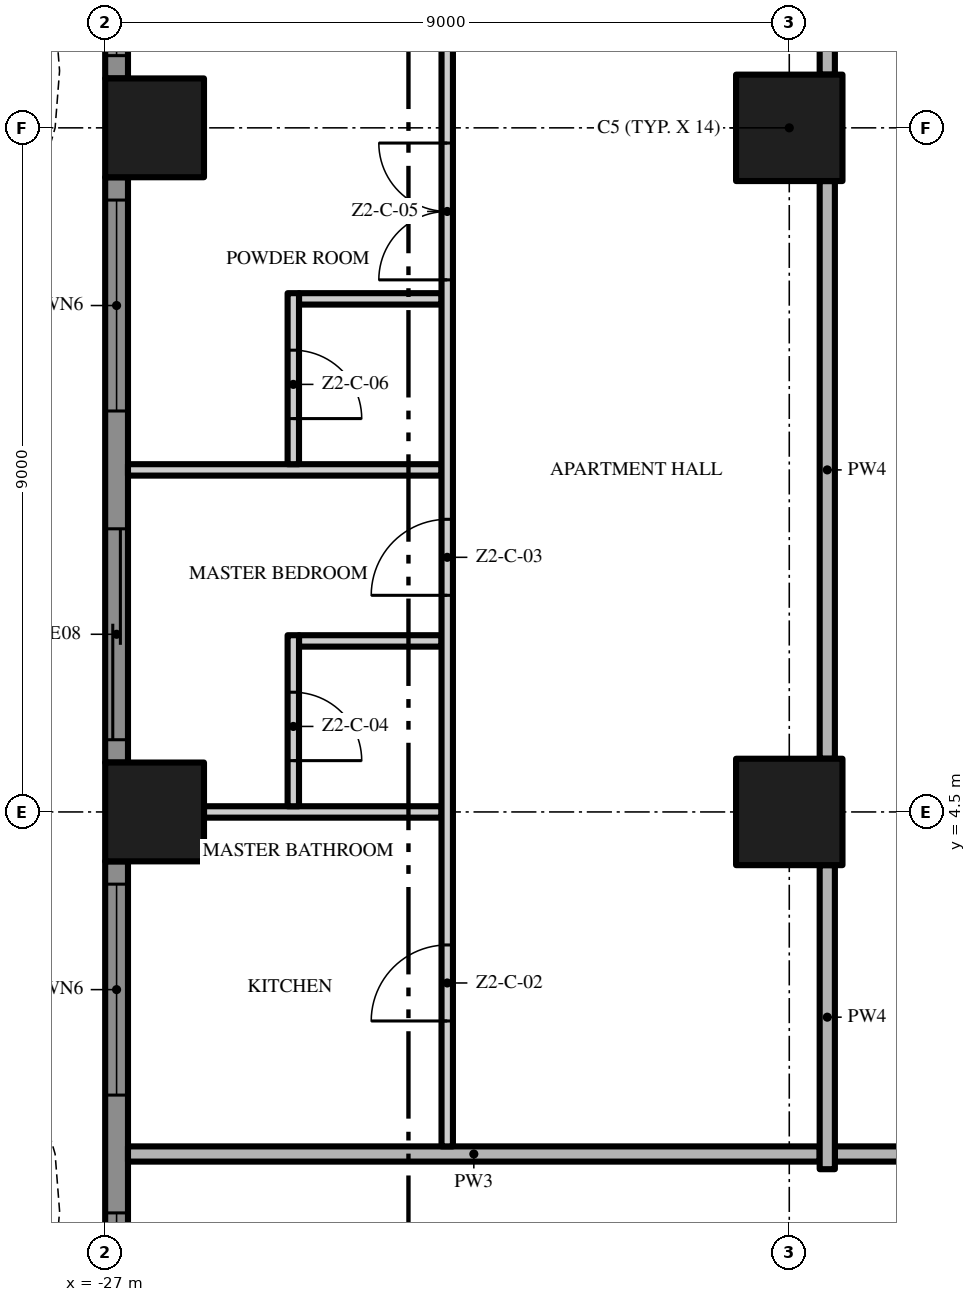
"""IFC4 building model, lengths in metres.
Left out: names, types, materials, properties, quantities, classifications, styles, units other than length and angle.
Written with IfcOpenShell. Run it as: python <this file> out.ifc"""

import sys

from ifc_helpers import new_model, si_unit, direction, frame, frame_2d, origin, origin_2d, place, context, subcontext, project, spatial, polyline, rectangle, outline, extrude, element, fill, save


model = new_model("IFC4")
c1 = context("Model", 3, precision=1e-05, world=origin(), true_north=direction((0.0, 1.0)))
c2 = subcontext(c1, "Body", "Model", "MODEL_VIEW")
j1 = project(units=[si_unit("LENGTHUNIT", "METRE"), si_unit("PLANEANGLEUNIT", "RADIAN")], contexts=[c1])
p1 = place(None, origin())
s1 = spatial("IfcSite", under=j1, at=p1, CompositionType="ELEMENT")
p2 = place(p1, origin())
s2 = spatial("IfcBuilding", under=s1, at=p2, CompositionType="ELEMENT")
p3 = place(p2, frame((0.0, 0.0, 92.2)))
s3 = spatial("IfcBuildingStorey", under=s2, at=p3, CompositionType="ELEMENT", Elevation=92.2)
for number, where, z_axis, x_axis in (
    (1, (-18.0, 13.5, 0.0), (0.0, 0.0, 1.0), (1.0, 0.0, 0.0)),
    (2, (-18.0, 4.5, 0.0), (0.0, 0.0, 1.0), (1.0, 0.0, 0.0)),
):
    element("IfcColumn", number, at=place(p3, frame(where, z_axis=z_axis, x_axis=x_axis)), inside=s3, PredefinedType="COLUMN", context=c2, shape_type="SweptSolid", body=[
        extrude(rectangle(XDim=1.4, YDim=1.4, at=origin_2d()), origin(), (0.0, 0.0, 1.0), 3.5),
    ])
for number, where, z_axis, x_axis in (
    (3, (-26.35, 13.5, 0.0), (0.0, 0.0, 1.0), (1.0, 0.0, 0.0)),
    (4, (-26.35, 4.5, 0.0), (0.0, 0.0, 1.0), (1.0, 0.0, 0.0)),
):
    element("IfcColumn", number, at=place(p3, frame(where, z_axis=z_axis, x_axis=x_axis)), inside=s3, PredefinedType="COLUMN", context=c2, shape_type="SweptSolid", body=[
        extrude(rectangle(XDim=1.3, YDim=1.3, at=origin_2d()), origin(), (0.0, 0.0, 1.0), 3.5),
    ])
p4 = place(p3, frame((-26.85, 14.15, 0.0), z_axis=(0.0, 0.0, 1.0), x_axis=(0.0, 1.0, 0.0)))
e5 = element("IfcWall", 5, at=p4, inside=s3, PredefinedType="SOLIDWALL", context=c2, shape_type="SweptSolid", body=[
    extrude(rectangle(XDim=3.55, YDim=0.3, at=frame_2d((1.775, 0.0))), origin(), (0.0, 0.0, 1.0), 3.5),
])
p5 = place(p4, frame((0.3, 0.0, 0.45)))
e6 = element("IfcOpeningElement", 6, at=p5, cuts=e5, PredefinedType="OPENING", context=c2, shape_type="SweptSolid", body=[
    extrude(rectangle(XDim=2.775, YDim=2.65, at=frame_2d((1.387, 1.325))), frame((0.0, 0.16, 0.0), z_axis=(0.0, -1.0, 0.0), x_axis=(1.0, 0.0, 0.0)), (0.0, 0.0, 1.0), 0.32),
])
p6 = place(p3, frame((-26.85, 5.15, 0.0), z_axis=(0.0, 0.0, 1.0), x_axis=(0.0, 1.0, 0.0)))
e7 = element("IfcWall", 7, at=p6, inside=s3, PredefinedType="SOLIDWALL", context=c2, shape_type="SweptSolid", body=[
    extrude(rectangle(XDim=7.7, YDim=0.3, at=frame_2d((3.85, 0.0))), origin(), (0.0, 0.0, 1.0), 3.5),
])
p7 = place(p6, frame((4.625, 0.0, 0.45)))
e8 = element("IfcOpeningElement", 8, at=p7, cuts=e7, PredefinedType="OPENING", context=c2, shape_type="SweptSolid", body=[
    extrude(rectangle(XDim=2.775, YDim=2.65, at=frame_2d((1.387, 1.325))), frame((0.0, 0.16, 0.0), z_axis=(0.0, -1.0, 0.0), x_axis=(1.0, 0.0, 0.0)), (0.0, 0.0, 1.0), 0.32),
])
p8 = place(p6, frame((0.3, 0.0, 0.0)))
e9 = element("IfcOpeningElement", 9, at=p8, cuts=e7, PredefinedType="OPENING", context=c2, shape_type="SweptSolid", body=[
    extrude(rectangle(XDim=2.775, YDim=2.4, at=frame_2d((1.387, 1.2))), frame((0.0, 0.16, 0.0), z_axis=(0.0, -1.0, 0.0), x_axis=(1.0, 0.0, 0.0)), (0.0, 0.0, 1.0), 0.32),
])
p9 = place(p3, frame((-26.85, -3.85, 0.0), z_axis=(0.0, 0.0, 1.0), x_axis=(0.0, 1.0, 0.0)))
e10 = element("IfcWall", 10, at=p9, inside=s3, PredefinedType="SOLIDWALL", context=c2, shape_type="SweptSolid", body=[
    extrude(rectangle(XDim=7.7, YDim=0.3, at=frame_2d((3.85, 0.0))), origin(), (0.0, 0.0, 1.0), 3.5),
])
p10 = place(p9, frame((4.625, 0.0, 0.45)))
e11 = element("IfcOpeningElement", 11, at=p10, cuts=e10, PredefinedType="OPENING", context=c2, shape_type="SweptSolid", body=[
    extrude(rectangle(XDim=2.775, YDim=2.65, at=frame_2d((1.387, 1.325))), frame((0.0, 0.16, 0.0), z_axis=(0.0, -1.0, 0.0), x_axis=(1.0, 0.0, 0.0)), (0.0, 0.0, 1.0), 0.32),
])
p11 = place(p9, frame((0.3, 0.0, 0.45)))
e12 = element("IfcOpeningElement", 12, at=p11, cuts=e10, PredefinedType="OPENING", context=c2, shape_type="SweptSolid", body=[
    extrude(rectangle(XDim=2.775, YDim=2.65, at=frame_2d((1.387, 1.325))), frame((0.0, 0.16, 0.0), z_axis=(0.0, -1.0, 0.0), x_axis=(1.0, 0.0, 0.0)), (0.0, 0.0, 1.0), 0.32),
])
p12 = place(p3, origin())
e13 = element("IfcWall", 13, at=p12, inside=s3, PredefinedType="USERDEFINED", context=c2, shape_type="SweptSolid", body=[
    extrude(outline(polyline([(-28.8, 18.0), (-28.095, 16.5), (-27.659, 15.0), (-27.6, 14.25), (-27.659, 13.5), (-28.095, 12.0), (-28.8, 10.5), (-29.505, 9.0), (-29.941, 7.5), (-30.0, 6.75), (-29.941, 6.0), (-29.505, 4.5), (-28.8, 3.0), (-28.095, 1.5), (-27.659, 0.0), (-27.6, -0.75), (-27.659, -1.5), (-28.095, -3.0), (-28.8, -4.5), (-29.505, -6.0), (-29.941, -7.5), (-30.0, -8.25), (-29.941, -9.0), (-29.505, -10.5), (-28.8, -12.0), (-28.095, -13.5), (-27.659, -15.0), (-27.6, -15.75), (-27.659, -16.5), (-28.095, -18.0), (-27.855, -18.07), (-27.411, -16.545), (-27.349, -15.75), (-27.411, -14.955), (-27.86, -13.411), (-28.574, -11.894), (-29.271, -10.411), (-29.694, -8.955), (-29.749, -8.25), (-29.694, -7.545), (-29.271, -6.089), (-28.574, -4.606), (-27.86, -3.089), (-27.411, -1.545), (-27.349, -0.75), (-27.411, 0.045), (-27.86, 1.589), (-28.574, 3.106), (-29.271, 4.589), (-29.694, 6.045), (-29.749, 6.75), (-29.694, 7.455), (-29.271, 8.911), (-28.574, 10.394), (-27.86, 11.911), (-27.411, 13.455), (-27.349, 14.25), (-27.411, 15.045), (-27.86, 16.589), (-28.574, 18.106), (-28.8, 18.0)])), origin(), (0.0, 0.0, 1.0), 0.9),
])
p13 = place(p3, frame((-0.1, 0.0, 0.0), z_axis=(0.0, 0.0, 1.0), x_axis=(-1.0, 0.0, 0.0)))
e14 = element("IfcWall", 14, at=p13, inside=s3, PredefinedType="PARTITIONING", context=c2, shape_type="SweptSolid", body=[
    extrude(rectangle(XDim=17.3, YDim=0.2, at=frame_2d((8.65, 0.0))), origin(), (0.0, 0.0, 1.0), 3.5),
])
p14 = place(p13, frame((8.15, 0.0, 0.0)))
e15 = element("IfcOpeningElement", 15, at=p14, cuts=e14, PredefinedType="OPENING", context=c2, shape_type="SweptSolid", body=[
    extrude(rectangle(XDim=1.5, YDim=2.4, at=frame_2d((0.75, 1.2))), frame((0.0, 0.11, 0.0), z_axis=(0.0, -1.0, 0.0), x_axis=(1.0, 0.0, 0.0)), (0.0, 0.0, 1.0), 0.22),
])
p15 = place(p3, frame((-26.7, 0.0, 0.0), z_axis=(0.0, 0.0, 1.0), x_axis=(1.0, 0.0, 0.0)))
e16 = element("IfcWall", 16, at=p15, inside=s3, PredefinedType="PARTITIONING", context=c2, shape_type="SweptSolid", body=[
    extrude(rectangle(XDim=9.1, YDim=0.2, at=frame_2d((4.55, 0.0))), origin(), (0.0, 0.0, 1.0), 3.5),
])
p16 = place(p3, frame((-25.7, 4.5, 0.0), z_axis=(0.0, 0.0, 1.0), x_axis=(1.0, 0.0, 0.0)))
e17 = element("IfcWall", 17, at=p16, inside=s3, PredefinedType="PARTITIONING", context=c2, shape_type="SweptSolid", body=[
    extrude(rectangle(XDim=3.125, YDim=0.15, at=frame_2d((1.562, 0.0))), origin(), (0.0, 0.0, 1.0), 3.5),
])
p17 = place(p3, frame((-24.45, 6.75, 0.0), z_axis=(0.0, 0.0, 1.0), x_axis=(1.0, 0.0, 0.0)))
e18 = element("IfcWall", 18, at=p17, inside=s3, PredefinedType="PARTITIONING", context=c2, shape_type="SweptSolid", body=[
    extrude(rectangle(XDim=1.875, YDim=0.15, at=frame_2d((0.938, 0.0))), origin(), (0.0, 0.0, 1.0), 3.5),
])
p18 = place(p3, frame((-26.7, 9.0, 0.0), z_axis=(0.0, 0.0, 1.0), x_axis=(1.0, 0.0, 0.0)))
e19 = element("IfcWall", 19, at=p18, inside=s3, PredefinedType="PARTITIONING", context=c2, shape_type="SweptSolid", body=[
    extrude(rectangle(XDim=4.125, YDim=0.15, at=frame_2d((2.062, 0.0))), origin(), (0.0, 0.0, 1.0), 3.5),
])
p19 = place(p3, frame((-24.45, 11.25, 0.0), z_axis=(0.0, 0.0, 1.0), x_axis=(1.0, 0.0, 0.0)))
e20 = element("IfcWall", 20, at=p19, inside=s3, PredefinedType="PARTITIONING", context=c2, shape_type="SweptSolid", body=[
    extrude(rectangle(XDim=1.875, YDim=0.15, at=frame_2d((0.938, 0.0))), origin(), (0.0, 0.0, 1.0), 3.5),
])
p20 = place(p3, frame((-24.525, 6.825, 0.0), z_axis=(0.0, 0.0, 1.0), x_axis=(0.0, -1.0, 0.0)))
e21 = element("IfcWall", 21, at=p20, inside=s3, PredefinedType="PARTITIONING", context=c2, shape_type="SweptSolid", body=[
    extrude(rectangle(XDim=2.25, YDim=0.15, at=frame_2d((1.125, 0.0))), origin(), (0.0, 0.0, 1.0), 3.5),
])
p21 = place(p20, frame((0.75, 0.0, 0.0)))
e22 = element("IfcOpeningElement", 22, at=p21, cuts=e21, PredefinedType="OPENING", context=c2, shape_type="SweptSolid", body=[
    extrude(rectangle(XDim=0.9, YDim=2.1, at=frame_2d((0.45, 1.05))), frame((0.0, 0.085, 0.0), z_axis=(0.0, -1.0, 0.0), x_axis=(1.0, 0.0, 0.0)), (0.0, 0.0, 1.0), 0.17),
])
p22 = place(p3, frame((-24.525, 11.325, 0.0), z_axis=(0.0, 0.0, 1.0), x_axis=(0.0, -1.0, 0.0)))
e23 = element("IfcWall", 23, at=p22, inside=s3, PredefinedType="PARTITIONING", context=c2, shape_type="SweptSolid", body=[
    extrude(rectangle(XDim=2.25, YDim=0.15, at=frame_2d((1.125, 0.0))), origin(), (0.0, 0.0, 1.0), 3.5),
])
p23 = place(p22, frame((0.75, 0.0, 0.0)))
e24 = element("IfcOpeningElement", 24, at=p23, cuts=e23, PredefinedType="OPENING", context=c2, shape_type="SweptSolid", body=[
    extrude(rectangle(XDim=0.9, YDim=2.1, at=frame_2d((0.45, 1.05))), frame((0.0, 0.085, 0.0), z_axis=(0.0, -1.0, 0.0), x_axis=(1.0, 0.0, 0.0)), (0.0, 0.0, 1.0), 0.17),
])
p24 = place(p3, frame((-22.5, 0.1, 0.0), z_axis=(0.0, 0.0, 1.0), x_axis=(0.0, 1.0, 0.0)))
e25 = element("IfcWall", 25, at=p24, inside=s3, PredefinedType="PARTITIONING", context=c2, shape_type="SweptSolid", body=[
    extrude(rectangle(XDim=17.25, YDim=0.15, at=frame_2d((8.625, 0.0))), origin(), (0.0, 0.0, 1.0), 3.5),
])
p25 = place(p24, frame((1.65, 0.0, 0.0)))
e26 = element("IfcOpeningElement", 26, at=p25, cuts=e25, PredefinedType="OPENING", context=c2, shape_type="SweptSolid", body=[
    extrude(rectangle(XDim=1.0, YDim=2.4, at=frame_2d((0.5, 1.2))), frame((0.0, 0.085, 0.0), z_axis=(0.0, -1.0, 0.0), x_axis=(1.0, 0.0, 0.0)), (0.0, 0.0, 1.0), 0.17),
])
p26 = place(p24, frame((7.25, 0.0, 0.0)))
e27 = element("IfcOpeningElement", 27, at=p26, cuts=e25, PredefinedType="OPENING", context=c2, shape_type="SweptSolid", body=[
    extrude(rectangle(XDim=1.0, YDim=2.4, at=frame_2d((0.5, 1.2))), frame((0.0, 0.085, 0.0), z_axis=(0.0, -1.0, 0.0), x_axis=(1.0, 0.0, 0.0)), (0.0, 0.0, 1.0), 0.17),
])
p27 = place(p24, frame((11.4, 0.0, 0.0)))
e28 = element("IfcOpeningElement", 28, at=p27, cuts=e25, PredefinedType="OPENING", context=c2, shape_type="SweptSolid", body=[
    extrude(rectangle(XDim=1.8, YDim=2.4, at=frame_2d((0.9, 1.2))), frame((0.0, 0.085, 0.0), z_axis=(0.0, -1.0, 0.0), x_axis=(1.0, 0.0, 0.0)), (0.0, 0.0, 1.0), 0.17),
])
p28 = place(p3, frame((-17.5, -0.2, 0.0), z_axis=(0.0, 0.0, 1.0), x_axis=(0.0, 1.0, 0.0)))
e29 = element("IfcWall", 29, at=p28, inside=s3, PredefinedType="PARTITIONING", context=c2, shape_type="SweptSolid", body=[
    extrude(rectangle(XDim=4.0, YDim=0.2, at=frame_2d((2.0, 0.0))), origin(), (0.0, 0.0, 1.0), 3.5),
])
p29 = place(p3, frame((-17.5, 5.2, 0.0), z_axis=(0.0, 0.0, 1.0), x_axis=(0.0, 1.0, 0.0)))
e30 = element("IfcWall", 30, at=p29, inside=s3, PredefinedType="PARTITIONING", context=c2, shape_type="SweptSolid", body=[
    extrude(rectangle(XDim=7.6, YDim=0.2, at=frame_2d((3.8, 0.0))), origin(), (0.0, 0.0, 1.0), 3.5),
])
p30 = place(p3, frame((-17.5, 14.2, 0.0), z_axis=(0.0, 0.0, 1.0), x_axis=(0.0, 1.0, 0.0)))
e31 = element("IfcWall", 31, at=p30, inside=s3, PredefinedType="PARTITIONING", context=c2, shape_type="SweptSolid", body=[
    extrude(rectangle(XDim=7.0, YDim=0.2, at=frame_2d((3.5, 0.0))), origin(), (0.0, 0.0, 1.0), 3.5),
])
p31 = place(p30, frame((0.95, 0.0, 0.0)))
e32 = element("IfcOpeningElement", 32, at=p31, cuts=e31, PredefinedType="OPENING", context=c2, shape_type="SweptSolid", body=[
    extrude(rectangle(XDim=1.2, YDim=2.4, at=frame_2d((0.6, 1.2))), frame((0.0, 0.11, 0.0), z_axis=(0.0, -1.0, 0.0), x_axis=(1.0, 0.0, 0.0)), (0.0, 0.0, 1.0), 0.22),
])
p32 = place(p5, origin())
e33 = element("IfcWindow", 33, at=p32, inside=s3, PartitioningType="SINGLE_PANEL", PredefinedType="WINDOW", context=c2, shape_type="SweptSolid", body=[
    extrude(rectangle(XDim=2.775, YDim=2.65, at=frame_2d((1.387, 1.325))), frame((0.0, 0.03, 0.0), z_axis=(0.0, -1.0, 0.0), x_axis=(1.0, 0.0, 0.0)), (0.0, 0.0, 1.0), 0.06),
])
fill(e6, e33)
p33 = place(p7, origin())
e34 = element("IfcWindow", 34, at=p33, inside=s3, PartitioningType="SINGLE_PANEL", PredefinedType="WINDOW", context=c2, shape_type="SweptSolid", body=[
    extrude(rectangle(XDim=2.775, YDim=2.65, at=frame_2d((1.387, 1.325))), frame((0.0, 0.03, 0.0), z_axis=(0.0, -1.0, 0.0), x_axis=(1.0, 0.0, 0.0)), (0.0, 0.0, 1.0), 0.06),
])
fill(e8, e34)
p34 = place(p8, origin())
e35 = element("IfcDoor", 35, at=p34, inside=s3, OperationType="SINGLE_SWING_LEFT", PredefinedType="DOOR", context=c2, shape_type="SweptSolid", body=[
    extrude(rectangle(XDim=2.775, YDim=2.4, at=frame_2d((1.387, 1.2))), frame((0.0, 0.025, 0.0), z_axis=(0.0, -1.0, 0.0), x_axis=(1.0, 0.0, 0.0)), (0.0, 0.0, 1.0), 0.05),
])
fill(e9, e35)
p35 = place(p10, origin())
e36 = element("IfcWindow", 36, at=p35, inside=s3, PartitioningType="SINGLE_PANEL", PredefinedType="WINDOW", context=c2, shape_type="SweptSolid", body=[
    extrude(rectangle(XDim=2.775, YDim=2.65, at=frame_2d((1.387, 1.325))), frame((0.0, 0.03, 0.0), z_axis=(0.0, -1.0, 0.0), x_axis=(1.0, 0.0, 0.0)), (0.0, 0.0, 1.0), 0.06),
])
fill(e11, e36)
p36 = place(p11, origin())
e37 = element("IfcWindow", 37, at=p36, inside=s3, PartitioningType="SINGLE_PANEL", PredefinedType="WINDOW", context=c2, shape_type="SweptSolid", body=[
    extrude(rectangle(XDim=2.775, YDim=2.65, at=frame_2d((1.387, 1.325))), frame((0.0, 0.03, 0.0), z_axis=(0.0, -1.0, 0.0), x_axis=(1.0, 0.0, 0.0)), (0.0, 0.0, 1.0), 0.06),
])
fill(e12, e37)
p37 = place(p25, origin())
e38 = element("IfcDoor", 38, at=p37, inside=s3, OperationType="SINGLE_SWING_LEFT", PredefinedType="DOOR", context=c2, shape_type="SweptSolid", body=[
    extrude(rectangle(XDim=1.0, YDim=2.4, at=frame_2d((0.5, 1.2))), frame((0.0, 0.025, 0.0), z_axis=(0.0, -1.0, 0.0), x_axis=(1.0, 0.0, 0.0)), (0.0, 0.0, 1.0), 0.05),
])
fill(e26, e38)
p38 = place(p26, origin())
e39 = element("IfcDoor", 39, at=p38, inside=s3, OperationType="SINGLE_SWING_LEFT", PredefinedType="DOOR", context=c2, shape_type="SweptSolid", body=[
    extrude(rectangle(XDim=1.0, YDim=2.4, at=frame_2d((0.5, 1.2))), frame((0.0, 0.025, 0.0), z_axis=(0.0, -1.0, 0.0), x_axis=(1.0, 0.0, 0.0)), (0.0, 0.0, 1.0), 0.05),
])
fill(e27, e39)
p39 = place(p21, origin())
e40 = element("IfcDoor", 40, at=p39, inside=s3, OperationType="SINGLE_SWING_RIGHT", PredefinedType="DOOR", context=c2, shape_type="SweptSolid", body=[
    extrude(rectangle(XDim=0.9, YDim=2.1, at=frame_2d((0.45, 1.05))), frame((0.0, 0.025, 0.0), z_axis=(0.0, -1.0, 0.0), x_axis=(1.0, 0.0, 0.0)), (0.0, 0.0, 1.0), 0.05),
])
fill(e22, e40)
p40 = place(p27, origin())
e41 = element("IfcDoor", 41, at=p40, inside=s3, OperationType="DOUBLE_DOOR_SINGLE_SWING", PredefinedType="DOOR", context=c2, shape_type="SweptSolid", body=[
    extrude(rectangle(XDim=1.8, YDim=2.4, at=frame_2d((0.9, 1.2))), frame((0.0, 0.025, 0.0), z_axis=(0.0, -1.0, 0.0), x_axis=(1.0, 0.0, 0.0)), (0.0, 0.0, 1.0), 0.05),
])
fill(e28, e41)
p41 = place(p23, origin())
e42 = element("IfcDoor", 42, at=p41, inside=s3, OperationType="SINGLE_SWING_RIGHT", PredefinedType="DOOR", context=c2, shape_type="SweptSolid", body=[
    extrude(rectangle(XDim=0.9, YDim=2.1, at=frame_2d((0.45, 1.05))), frame((0.0, 0.025, 0.0), z_axis=(0.0, -1.0, 0.0), x_axis=(1.0, 0.0, 0.0)), (0.0, 0.0, 1.0), 0.05),
])
fill(e24, e42)
save(model, sys.argv[1])
